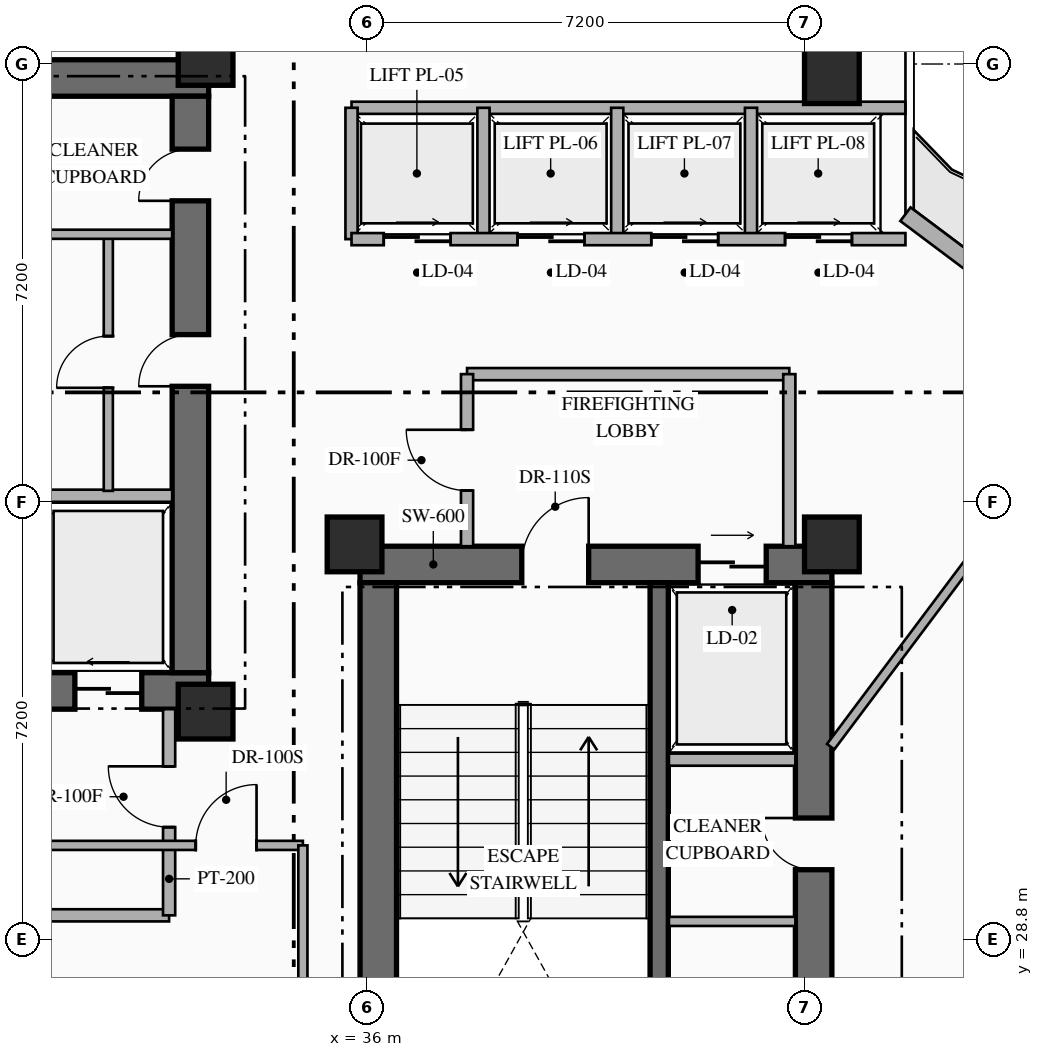
"""IFC4 building model, lengths in metres.
Left out: names, types, materials, properties, quantities, classifications, styles, units other than length and angle.
Written with IfcOpenShell. Run it as: python <this file> out.ifc"""

import sys

from ifc_helpers import new_model, si_unit, direction, frame, frame_2d, origin, origin_2d, place, context, subcontext, project, spatial, rectangle, extrude, element, fill, save


model = new_model("IFC4")
c1 = context("Model", 3, precision=1e-05, world=origin(), true_north=direction((0.0, 1.0)))
c2 = subcontext(c1, "Body", "Model", "MODEL_VIEW")
j1 = project(units=[si_unit("LENGTHUNIT", "METRE"), si_unit("PLANEANGLEUNIT", "RADIAN")], contexts=[c1])
p1 = place(None, origin())
s1 = spatial("IfcSite", under=j1, at=p1, CompositionType="ELEMENT")
p2 = place(p1, origin())
s2 = spatial("IfcBuilding", under=s1, at=p2, CompositionType="ELEMENT")
p3 = place(p2, frame((0.0, 0.0, 152.85)))
s3 = spatial("IfcBuildingStorey", under=s2, at=p3, CompositionType="ELEMENT", Elevation=152.85)
p4 = place(p3, frame((25.62, 32.89, 0.0), z_axis=(0.0, 0.0, 1.0), x_axis=(1.0, 0.0, 0.0)))
e1 = element("IfcWall", 1, at=p4, inside=s3, PredefinedType="SHEAR", context=c2, shape_type="SweptSolid", body=[
    extrude(rectangle(XDim=7.78, YDim=0.6, at=frame_2d((3.89, 0.0))), origin(), (0.0, 0.0, 1.0), 3.6),
])
p5 = place(p4, frame((2.83, 0.0, 0.0)))
e2 = element("IfcOpeningElement", 2, at=p5, cuts=e1, PredefinedType="OPENING", context=c2, shape_type="SweptSolid", body=[
    extrude(rectangle(XDim=1.1, YDim=2.2, at=frame_2d((0.55, 1.1))), frame((0.0, 0.31, 0.0), z_axis=(0.0, -1.0, 0.0), x_axis=(1.0, 0.0, 0.0)), (0.0, 0.0, 1.0), 0.62),
])
p6 = place(p4, frame((5.58, 0.0, 0.0)))
e3 = element("IfcOpeningElement", 3, at=p6, cuts=e1, PredefinedType="OPENING", context=c2, shape_type="SweptSolid", body=[
    extrude(rectangle(XDim=1.1, YDim=2.15, at=frame_2d((0.55, 1.075))), frame((0.0, 0.31, 0.0), z_axis=(0.0, -1.0, 0.0), x_axis=(1.0, 0.0, 0.0)), (0.0, 0.0, 1.0), 0.62),
])
p7 = place(p3, frame((25.62, 42.97, 0.0), z_axis=(0.0, 0.0, 1.0), x_axis=(1.0, 0.0, 0.0)))
e4 = element("IfcWall", 4, at=p7, inside=s3, PredefinedType="SHEAR", context=c2, shape_type="SweptSolid", body=[
    extrude(rectangle(XDim=7.78, YDim=0.6, at=frame_2d((3.89, 0.0))), origin(), (0.0, 0.0, 1.0), 3.6),
])
p8 = place(p3, frame((33.1, 33.19, 0.0), z_axis=(0.0, 0.0, 1.0), x_axis=(0.0, 1.0, 0.0)))
e5 = element("IfcWall", 5, at=p8, inside=s3, PredefinedType="SHEAR", context=c2, shape_type="SweptSolid", body=[
    extrude(rectangle(XDim=9.48, YDim=0.6, at=frame_2d((4.74, 0.0))), origin(), (0.0, 0.0, 1.0), 3.6),
])
p9 = place(p8, frame((4.71, 0.0, 0.0)))
e6 = element("IfcOpeningElement", 6, at=p9, cuts=e5, PredefinedType="OPENING", context=c2, shape_type="SweptSolid", body=[
    extrude(rectangle(XDim=0.85, YDim=2.08, at=frame_2d((0.425, 1.04))), frame((0.0, 0.31, 0.0), z_axis=(0.0, -1.0, 0.0), x_axis=(1.0, 0.0, 0.0)), (0.0, 0.0, 1.0), 0.62),
])
p10 = place(p8, frame((7.76, 0.0, 0.0)))
e7 = element("IfcOpeningElement", 7, at=p10, cuts=e5, PredefinedType="OPENING", context=c2, shape_type="SweptSolid", body=[
    extrude(rectangle(XDim=0.85, YDim=2.08, at=frame_2d((0.425, 1.04))), frame((0.0, 0.31, 0.0), z_axis=(0.0, -1.0, 0.0), x_axis=(1.0, 0.0, 0.0)), (0.0, 0.0, 1.0), 0.62),
])
p11 = place(p3, frame((35.89, 34.97, 0.0), z_axis=(0.0, 0.0, 1.0), x_axis=(1.0, 0.0, 0.0)))
e8 = element("IfcWall", 8, at=p11, inside=s3, PredefinedType="SHEAR", context=c2, shape_type="SweptSolid", body=[
    extrude(rectangle(XDim=7.76, YDim=0.6, at=frame_2d((3.88, 0.0))), origin(), (0.0, 0.0, 1.0), 3.6),
])
p12 = place(p11, frame((2.66, 0.0, 0.0)))
e9 = element("IfcOpeningElement", 9, at=p12, cuts=e8, PredefinedType="OPENING", context=c2, shape_type="SweptSolid", body=[
    extrude(rectangle(XDim=1.1, YDim=2.2, at=frame_2d((0.55, 1.1))), frame((0.0, 0.31, 0.0), z_axis=(0.0, -1.0, 0.0), x_axis=(1.0, 0.0, 0.0)), (0.0, 0.0, 1.0), 0.62),
])
p13 = place(p11, frame((5.56, 0.0, 0.0)))
e10 = element("IfcOpeningElement", 10, at=p13, cuts=e8, PredefinedType="OPENING", context=c2, shape_type="SweptSolid", body=[
    extrude(rectangle(XDim=1.12, YDim=2.15, at=frame_2d((0.56, 1.075))), frame((0.0, 0.31, 0.0), z_axis=(0.0, -1.0, 0.0), x_axis=(1.0, 0.0, 0.0)), (0.0, 0.0, 1.0), 0.62),
])
p14 = place(p3, frame((36.19, 25.19, 0.0), z_axis=(0.0, 0.0, 1.0), x_axis=(0.0, 1.0, 0.0)))
e11 = element("IfcWall", 11, at=p14, inside=s3, PredefinedType="SHEAR", context=c2, shape_type="SweptSolid", body=[
    extrude(rectangle(XDim=9.48, YDim=0.6, at=frame_2d((4.74, 0.0))), origin(), (0.0, 0.0, 1.0), 3.6),
])
p15 = place(p3, frame((43.35, 25.19, 0.0), z_axis=(0.0, 0.0, 1.0), x_axis=(0.0, 1.0, 0.0)))
e12 = element("IfcWall", 12, at=p15, inside=s3, PredefinedType="SHEAR", context=c2, shape_type="SweptSolid", body=[
    extrude(rectangle(XDim=9.48, YDim=0.6, at=frame_2d((4.74, 0.0))), origin(), (0.0, 0.0, 1.0), 3.6),
])
p16 = place(p15, frame((1.51, 0.0, 0.0)))
e13 = element("IfcOpeningElement", 13, at=p16, cuts=e12, PredefinedType="OPENING", context=c2, shape_type="SweptSolid", body=[
    extrude(rectangle(XDim=0.85, YDim=2.08, at=frame_2d((0.425, 1.04))), frame((0.0, 0.31, 0.0), z_axis=(0.0, -1.0, 0.0), x_axis=(1.0, 0.0, 0.0)), (0.0, 0.0, 1.0), 0.62),
])
p17 = place(p15, frame((4.76, 0.0, 0.0)))
e14 = element("IfcOpeningElement", 14, at=p17, cuts=e12, PredefinedType="OPENING", context=c2, shape_type="SweptSolid", body=[
    extrude(rectangle(XDim=0.85, YDim=2.08, at=frame_2d((0.425, 1.04))), frame((0.0, 0.31, 0.0), z_axis=(0.0, -1.0, 0.0), x_axis=(1.0, 0.0, 0.0)), (0.0, 0.0, 1.0), 0.62),
])
p18 = place(p3, frame((40.81, 25.19, 0.0), z_axis=(0.0, 0.0, 1.0), x_axis=(0.0, 1.0, 0.0)))
e15 = element("IfcWall", 15, at=p18, inside=s3, PredefinedType="SHEAR", context=c2, shape_type="SweptSolid", body=[
    extrude(rectangle(XDim=9.48, YDim=0.3, at=frame_2d((4.74, 0.0))), origin(), (0.0, 0.0, 1.0), 3.6),
])
for number, where, z_axis, x_axis in (
    (16, (33.35, 32.55, 0.0), (0.0, 0.0, 1.0), (1.0, 0.0, 0.0)),
    (17, (33.35, 43.3, 0.0), (0.0, 0.0, 1.0), (1.0, 0.0, 0.0)),
    (18, (35.8, 35.3, 0.0), (0.0, 0.0, 1.0), (1.0, 0.0, 0.0)),
    (19, (43.65, 35.3, 0.0), (0.0, 0.0, 1.0), (1.0, 0.0, 0.0)),
    (20, (43.65, 43.0, 0.0), (0.0, 0.0, 1.0), (1.0, 0.0, 0.0)),
):
    element("IfcColumn", number, at=place(p3, frame(where, z_axis=z_axis, x_axis=x_axis)), inside=s3, PredefinedType="COLUMN", context=c2, shape_type="SweptSolid", body=[
        extrude(rectangle(XDim=0.9, YDim=0.9, at=origin_2d()), origin(), (0.0, 0.0, 1.0), 3.6),
    ])
p19 = place(p3, frame((44.86, 40.73, 0.0), z_axis=(0.0, 0.0, 1.0), x_axis=(0.800007624502, -0.599989833863, 0.0)))
e21 = element("IfcWall", 21, at=p19, inside=s3, PredefinedType="STANDARD", context=c2, shape_type="SweptSolid", body=[
    extrude(rectangle(XDim=19.212, YDim=0.28, at=frame_2d((9.606, 0.0))), origin(), (0.0, 0.0, 1.0), 3.35),
])
p20 = place(p19, frame((1.755, 0.0, 0.0)))
e22 = element("IfcOpeningElement", 22, at=p20, cuts=e21, PredefinedType="OPENING", context=c2, shape_type="SweptSolid", body=[
    extrude(rectangle(XDim=1.1, YDim=2.2, at=frame_2d((0.55, 1.1))), frame((0.0, 0.15, 0.0), z_axis=(0.0, -1.0, 0.0), x_axis=(1.0, 0.0, 0.0)), (0.0, 0.0, 1.0), 0.3),
])
p21 = place(p19, frame((13.509, 0.0, 0.85)))
e23 = element("IfcOpeningElement", 23, at=p21, cuts=e21, PredefinedType="OPENING", context=c2, shape_type="SweptSolid", body=[
    extrude(rectangle(XDim=1.8, YDim=2.1, at=frame_2d((0.9, 1.05))), frame((0.0, 0.15, 0.0), z_axis=(0.0, -1.0, 0.0), x_axis=(1.0, 0.0, 0.0)), (0.0, 0.0, 1.0), 0.3),
])
p22 = place(p3, frame((30.7, 36.1, 0.0), z_axis=(0.0, 0.0, 1.0), x_axis=(1.0, 0.0, 0.0)))
e24 = element("IfcWall", 24, at=p22, inside=s3, PredefinedType="STANDARD", context=c2, shape_type="SweptSolid", body=[
    extrude(rectangle(XDim=2.1, YDim=0.2, at=frame_2d((1.05, 0.0))), origin(), (0.0, 0.0, 1.0), 3.35),
])
p23 = place(p3, frame((31.75, 36.18, 0.0), z_axis=(0.0, 0.0, 1.0), x_axis=(0.0, 1.0, 0.0)))
e25 = element("IfcWall", 25, at=p23, inside=s3, PredefinedType="PARTITIONING", context=c2, shape_type="SweptSolid", body=[
    extrude(rectangle(XDim=4.24, YDim=0.15, at=frame_2d((2.12, 0.0))), origin(), (0.0, 0.0, 1.0), 3.35),
])
p24 = place(p23, frame((1.695, 0.0, 0.0)))
e26 = element("IfcOpeningElement", 26, at=p24, cuts=e25, PredefinedType="OPENING", context=c2, shape_type="SweptSolid", body=[
    extrude(rectangle(XDim=0.85, YDim=2.08, at=frame_2d((0.425, 1.04))), frame((0.0, 0.085, 0.0), z_axis=(0.0, -1.0, 0.0), x_axis=(1.0, 0.0, 0.0)), (0.0, 0.0, 1.0), 0.17),
])
p25 = place(p3, frame((30.7, 40.4, 0.0), z_axis=(0.0, 0.0, 1.0), x_axis=(1.0, 0.0, 0.0)))
e27 = element("IfcWall", 27, at=p25, inside=s3, PredefinedType="PARTITIONING", context=c2, shape_type="SweptSolid", body=[
    extrude(rectangle(XDim=2.1, YDim=0.15, at=frame_2d((1.05, 0.0))), origin(), (0.0, 0.0, 1.0), 3.35),
])
p26 = place(p3, frame((40.97, 31.76, 0.0), z_axis=(0.0, 0.0, 1.0), x_axis=(1.0, 0.0, 0.0)))
e28 = element("IfcWall", 28, at=p26, inside=s3, PredefinedType="STANDARD", context=c2, shape_type="SweptSolid", body=[
    extrude(rectangle(XDim=2.08, YDim=0.2, at=frame_2d((1.04, 0.0))), origin(), (0.0, 0.0, 1.0), 3.35),
])
p27 = place(p3, frame((40.97, 29.1, 0.0), z_axis=(0.0, 0.0, 1.0), x_axis=(1.0, 0.0, 0.0)))
e29 = element("IfcWall", 29, at=p27, inside=s3, PredefinedType="PARTITIONING", context=c2, shape_type="SweptSolid", body=[
    extrude(rectangle(XDim=2.08, YDim=0.15, at=frame_2d((1.04, 0.0))), origin(), (0.0, 0.0, 1.0), 3.35),
])
p28 = place(p3, frame((27.6, 29.2, 0.0), z_axis=(0.0, 0.0, 1.0), x_axis=(1.0, 0.0, 0.0)))
e30 = element("IfcWall", 30, at=p28, inside=s3, PredefinedType="STANDARD", context=c2, shape_type="SweptSolid", body=[
    extrude(rectangle(XDim=5.15, YDim=0.2, at=frame_2d((2.575, 0.0))), origin(), (0.0, 0.0, 1.0), 3.35),
])
p29 = place(p3, frame((32.75, 29.2, 0.0), z_axis=(0.0, 0.0, 1.0), x_axis=(0.0, 1.0, 0.0)))
e31 = element("IfcWall", 31, at=p29, inside=s3, PredefinedType="STANDARD", context=c2, shape_type="SweptSolid", body=[
    extrude(rectangle(XDim=3.39, YDim=0.2, at=frame_2d((1.695, 0.0))), origin(), (0.0, 0.0, 1.0), 3.35),
])
p30 = place(p29, frame((1.45, 0.0, 0.0)))
e32 = element("IfcOpeningElement", 32, at=p30, cuts=e31, PredefinedType="OPENING", context=c2, shape_type="SweptSolid", body=[
    extrude(rectangle(XDim=1.0, YDim=2.2, at=frame_2d((0.5, 1.1))), frame((0.0, 0.11, 0.0), z_axis=(0.0, -1.0, 0.0), x_axis=(1.0, 0.0, 0.0)), (0.0, 0.0, 1.0), 0.22),
])
p31 = place(p3, frame((37.65, 38.1, 0.0), z_axis=(0.0, 0.0, 1.0), x_axis=(1.0, 0.0, 0.0)))
e33 = element("IfcWall", 33, at=p31, inside=s3, PredefinedType="STANDARD", context=c2, shape_type="SweptSolid", body=[
    extrude(rectangle(XDim=5.3, YDim=0.2, at=frame_2d((2.65, 0.0))), origin(), (0.0, 0.0, 1.0), 3.35),
])
p32 = place(p3, frame((42.95, 35.27, 0.0), z_axis=(0.0, 0.0, 1.0), x_axis=(0.0, 1.0, 0.0)))
e34 = element("IfcWall", 34, at=p32, inside=s3, PredefinedType="STANDARD", context=c2, shape_type="SweptSolid", body=[
    extrude(rectangle(XDim=2.83, YDim=0.2, at=frame_2d((1.415, 0.0))), origin(), (0.0, 0.0, 1.0), 3.35),
])
p33 = place(p3, frame((37.65, 35.27, 0.0), z_axis=(0.0, 0.0, 1.0), x_axis=(0.0, 1.0, 0.0)))
e35 = element("IfcWall", 35, at=p33, inside=s3, PredefinedType="STANDARD", context=c2, shape_type="SweptSolid", body=[
    extrude(rectangle(XDim=2.83, YDim=0.2, at=frame_2d((1.415, 0.0))), origin(), (0.0, 0.0, 1.0), 3.35),
])
p34 = place(p33, frame((0.915, 0.0, 0.0)))
e36 = element("IfcOpeningElement", 36, at=p34, cuts=e35, PredefinedType="OPENING", context=c2, shape_type="SweptSolid", body=[
    extrude(rectangle(XDim=1.0, YDim=2.2, at=frame_2d((0.5, 1.1))), frame((0.0, 0.11, 0.0), z_axis=(0.0, -1.0, 0.0), x_axis=(1.0, 0.0, 0.0)), (0.0, 0.0, 1.0), 0.22),
])
p35 = place(p3, frame((35.75, 42.48, 0.0), z_axis=(0.0, 0.0, 1.0), x_axis=(1.0, 0.0, 0.0)))
e37 = element("IfcWall", 37, at=p35, inside=s3, PredefinedType="STANDARD", context=c2, shape_type="SweptSolid", body=[
    extrude(rectangle(XDim=9.11, YDim=0.2, at=frame_2d((4.555, 0.0))), origin(), (0.0, 0.0, 1.0), 3.35),
])
for number, where, z_axis, x_axis in (
    (38, (35.75, 40.32, 0.0), (0.0, 0.0, 1.0), (0.0, 1.0, 0.0)),
    (39, (37.92, 40.32, 0.0), (0.0, 0.0, 1.0), (0.0, 1.0, 0.0)),
    (40, (40.12, 40.32, 0.0), (0.0, 0.0, 1.0), (0.0, 1.0, 0.0)),
    (41, (42.32, 40.32, 0.0), (0.0, 0.0, 1.0), (0.0, 1.0, 0.0)),
):
    element("IfcWall", number, at=place(p3, frame(where, z_axis=z_axis, x_axis=x_axis)), inside=s3, PredefinedType="STANDARD", context=c2, shape_type="SweptSolid", body=[
        extrude(rectangle(XDim=2.16, YDim=0.2, at=frame_2d((1.08, 0.0))), origin(), (0.0, 0.0, 1.0), 3.35),
    ])
p36 = place(p3, frame((35.75, 40.32, 0.0), z_axis=(0.0, 0.0, 1.0), x_axis=(1.0, 0.0, 0.0)))
e42 = element("IfcWall", 42, at=p36, inside=s3, PredefinedType="STANDARD", context=c2, shape_type="SweptSolid", body=[
    extrude(rectangle(XDim=9.11, YDim=0.2, at=frame_2d((4.555, 0.0))), origin(), (0.0, 0.0, 1.0), 3.35),
])
p37 = place(p36, frame((0.53, 0.0, 0.0)))
e43 = element("IfcOpeningElement", 43, at=p37, cuts=e42, PredefinedType="OPENING", context=c2, shape_type="SweptSolid", body=[
    extrude(rectangle(XDim=1.1, YDim=2.18, at=frame_2d((0.55, 1.09))), frame((0.0, 0.11, 0.0), z_axis=(0.0, -1.0, 0.0), x_axis=(1.0, 0.0, 0.0)), (0.0, 0.0, 1.0), 0.22),
])
p38 = place(p36, frame((2.73, 0.0, 0.0)))
e44 = element("IfcOpeningElement", 44, at=p38, cuts=e42, PredefinedType="OPENING", context=c2, shape_type="SweptSolid", body=[
    extrude(rectangle(XDim=1.1, YDim=2.18, at=frame_2d((0.55, 1.09))), frame((0.0, 0.11, 0.0), z_axis=(0.0, -1.0, 0.0), x_axis=(1.0, 0.0, 0.0)), (0.0, 0.0, 1.0), 0.22),
])
p39 = place(p36, frame((4.93, 0.0, 0.0)))
e45 = element("IfcOpeningElement", 45, at=p39, cuts=e42, PredefinedType="OPENING", context=c2, shape_type="SweptSolid", body=[
    extrude(rectangle(XDim=1.1, YDim=2.18, at=frame_2d((0.55, 1.09))), frame((0.0, 0.11, 0.0), z_axis=(0.0, -1.0, 0.0), x_axis=(1.0, 0.0, 0.0)), (0.0, 0.0, 1.0), 0.22),
])
p40 = place(p36, frame((7.13, 0.0, 0.0)))
e46 = element("IfcOpeningElement", 46, at=p40, cuts=e42, PredefinedType="OPENING", context=c2, shape_type="SweptSolid", body=[
    extrude(rectangle(XDim=1.1, YDim=2.18, at=frame_2d((0.55, 1.09))), frame((0.0, 0.11, 0.0), z_axis=(0.0, -1.0, 0.0), x_axis=(1.0, 0.0, 0.0)), (0.0, 0.0, 1.0), 0.22),
])
p41 = place(p3, frame((25.55, 30.35, 0.0), z_axis=(0.0, 0.0, 1.0), x_axis=(1.0, 0.0, 0.0)))
e47 = element("IfcWall", 47, at=p41, inside=s3, PredefinedType="PARTITIONING", context=c2, shape_type="SweptSolid", body=[
    extrude(rectangle(XDim=9.4, YDim=0.15, at=frame_2d((4.7, 0.0))), origin(), (0.0, 0.0, 1.0), 3.35),
])
p42 = place(p41, frame((7.638, 0.0, 0.0)))
e48 = element("IfcOpeningElement", 48, at=p42, cuts=e47, PredefinedType="OPENING", context=c2, shape_type="SweptSolid", body=[
    extrude(rectangle(XDim=1.0, YDim=2.15, at=frame_2d((0.5, 1.075))), frame((0.0, 0.085, 0.0), z_axis=(0.0, -1.0, 0.0), x_axis=(1.0, 0.0, 0.0)), (0.0, 0.0, 1.0), 0.17),
])
p43 = place(p3, frame((34.95, 23.2, 0.0), z_axis=(0.0, 0.0, 1.0), x_axis=(0.0, 1.0, 0.0)))
e49 = element("IfcWall", 49, at=p43, inside=s3, PredefinedType="PARTITIONING", context=c2, shape_type="SweptSolid", body=[
    extrude(rectangle(XDim=7.15, YDim=0.15, at=frame_2d((3.575, 0.0))), origin(), (0.0, 0.0, 1.0), 3.35),
])
p44 = place(p3, frame((41.87, 17.96, 0.0), z_axis=(0.0, 0.0, 1.0), x_axis=(0.599994172676, 0.80000437046, 0.0)))
e50 = element("IfcWall", 50, at=p44, inside=s3, PredefinedType="PARTITIONING", context=c2, shape_type="SweptSolid", body=[
    extrude(rectangle(XDim=20.11, YDim=0.15, at=frame_2d((10.055, 0.0))), origin(), (0.0, 0.0, 1.0), 3.35),
])
p45 = place(p44, frame((9.58, 0.0, 0.0)))
e51 = element("IfcOpeningElement", 51, at=p45, cuts=e50, PredefinedType="OPENING", context=c2, shape_type="SweptSolid", body=[
    extrude(rectangle(XDim=0.95, YDim=2.15, at=frame_2d((0.475, 1.075))), frame((0.0, 0.085, 0.0), z_axis=(0.0, -1.0, 0.0), x_axis=(1.0, 0.0, 0.0)), (0.0, 0.0, 1.0), 0.17),
])
p46 = place(p3, frame((43.63, 31.973, 0.0), z_axis=(0.0, 0.0, 1.0), x_axis=(0.599975099311, 0.800018674911, 0.0)))
e52 = element("IfcWall", 52, at=p46, inside=s3, PredefinedType="PARTITIONING", context=c2, shape_type="SweptSolid", body=[
    extrude(rectangle(XDim=7.844, YDim=0.15, at=frame_2d((3.922, 0.0))), origin(), (0.0, 0.0, 1.0), 3.35),
])
p47 = place(p6, origin())
e53 = element("IfcDoor", 53, at=p47, inside=s3, OperationType="SLIDING_TO_LEFT", PredefinedType="USERDEFINED", context=c2, shape_type="SweptSolid", body=[
    extrude(rectangle(XDim=1.1, YDim=2.15, at=frame_2d((0.55, 1.075))), frame((0.0, 0.025, 0.0), z_axis=(0.0, -1.0, 0.0), x_axis=(1.0, 0.0, 0.0)), (0.0, 0.0, 1.0), 0.05),
])
fill(e3, e53)
p48 = place(p12, origin())
e54 = element("IfcDoor", 54, at=p48, inside=s3, OperationType="SINGLE_SWING_RIGHT", PredefinedType="DOOR", context=c2, shape_type="SweptSolid", body=[
    extrude(rectangle(XDim=1.1, YDim=2.2, at=frame_2d((0.55, 1.1))), frame((0.0, 0.025, 0.0), z_axis=(0.0, -1.0, 0.0), x_axis=(1.0, 0.0, 0.0)), (0.0, 0.0, 1.0), 0.05),
])
fill(e9, e54)
p49 = place(p13, origin())
e55 = element("IfcDoor", 55, at=p49, inside=s3, OperationType="SLIDING_TO_RIGHT", PredefinedType="USERDEFINED", context=c2, shape_type="SweptSolid", body=[
    extrude(rectangle(XDim=1.12, YDim=2.15, at=frame_2d((0.56, 1.075))), frame((0.0, 0.025, 0.0), z_axis=(0.0, -1.0, 0.0), x_axis=(1.0, 0.0, 0.0)), (0.0, 0.0, 1.0), 0.05),
])
fill(e10, e55)
p50 = place(p9, origin())
e56 = element("IfcDoor", 56, at=p50, inside=s3, OperationType="SINGLE_SWING_LEFT", PredefinedType="DOOR", context=c2, shape_type="SweptSolid", body=[
    extrude(rectangle(XDim=0.85, YDim=2.08, at=frame_2d((0.425, 1.04))), frame((0.0, 0.025, 0.0), z_axis=(0.0, -1.0, 0.0), x_axis=(1.0, 0.0, 0.0)), (0.0, 0.0, 1.0), 0.05),
])
fill(e6, e56)
p51 = place(p10, origin())
e57 = element("IfcDoor", 57, at=p51, inside=s3, OperationType="SINGLE_SWING_LEFT", PredefinedType="DOOR", context=c2, shape_type="SweptSolid", body=[
    extrude(rectangle(XDim=0.85, YDim=2.08, at=frame_2d((0.425, 1.04))), frame((0.0, 0.025, 0.0), z_axis=(0.0, -1.0, 0.0), x_axis=(1.0, 0.0, 0.0)), (0.0, 0.0, 1.0), 0.05),
])
fill(e7, e57)
p52 = place(p17, origin())
e58 = element("IfcDoor", 58, at=p52, inside=s3, OperationType="SINGLE_SWING_RIGHT", PredefinedType="DOOR", context=c2, shape_type="SweptSolid", body=[
    extrude(rectangle(XDim=0.85, YDim=2.08, at=frame_2d((0.425, 1.04))), frame((0.0, 0.025, 0.0), z_axis=(0.0, -1.0, 0.0), x_axis=(1.0, 0.0, 0.0)), (0.0, 0.0, 1.0), 0.05),
])
fill(e14, e58)
p53 = place(p24, origin())
e59 = element("IfcDoor", 59, at=p53, inside=s3, OperationType="SINGLE_SWING_LEFT", PredefinedType="DOOR", context=c2, shape_type="SweptSolid", body=[
    extrude(rectangle(XDim=0.85, YDim=2.08, at=frame_2d((0.425, 1.04))), frame((0.0, 0.025, 0.0), z_axis=(0.0, -1.0, 0.0), x_axis=(1.0, 0.0, 0.0)), (0.0, 0.0, 1.0), 0.05),
])
fill(e26, e59)
p54 = place(p30, origin())
e60 = element("IfcDoor", 60, at=p54, inside=s3, OperationType="SINGLE_SWING_RIGHT", PredefinedType="DOOR", context=c2, shape_type="SweptSolid", body=[
    extrude(rectangle(XDim=1.0, YDim=2.2, at=frame_2d((0.5, 1.1))), frame((0.0, 0.025, 0.0), z_axis=(0.0, -1.0, 0.0), x_axis=(1.0, 0.0, 0.0)), (0.0, 0.0, 1.0), 0.05),
])
fill(e32, e60)
p55 = place(p34, origin())
e61 = element("IfcDoor", 61, at=p55, inside=s3, OperationType="SINGLE_SWING_RIGHT", PredefinedType="DOOR", context=c2, shape_type="SweptSolid", body=[
    extrude(rectangle(XDim=1.0, YDim=2.2, at=frame_2d((0.5, 1.1))), frame((0.0, 0.025, 0.0), z_axis=(0.0, -1.0, 0.0), x_axis=(1.0, 0.0, 0.0)), (0.0, 0.0, 1.0), 0.05),
])
fill(e36, e61)
p56 = place(p37, origin())
e62 = element("IfcDoor", 62, at=p56, inside=s3, OperationType="SLIDING_TO_RIGHT", PredefinedType="USERDEFINED", context=c2, shape_type="SweptSolid", body=[
    extrude(rectangle(XDim=1.1, YDim=2.18, at=frame_2d((0.55, 1.09))), frame((0.0, 0.025, 0.0), z_axis=(0.0, -1.0, 0.0), x_axis=(1.0, 0.0, 0.0)), (0.0, 0.0, 1.0), 0.05),
])
fill(e43, e62)
p57 = place(p38, origin())
e63 = element("IfcDoor", 63, at=p57, inside=s3, OperationType="SLIDING_TO_RIGHT", PredefinedType="USERDEFINED", context=c2, shape_type="SweptSolid", body=[
    extrude(rectangle(XDim=1.1, YDim=2.18, at=frame_2d((0.55, 1.09))), frame((0.0, 0.025, 0.0), z_axis=(0.0, -1.0, 0.0), x_axis=(1.0, 0.0, 0.0)), (0.0, 0.0, 1.0), 0.05),
])
fill(e44, e63)
p58 = place(p39, origin())
e64 = element("IfcDoor", 64, at=p58, inside=s3, OperationType="SLIDING_TO_RIGHT", PredefinedType="USERDEFINED", context=c2, shape_type="SweptSolid", body=[
    extrude(rectangle(XDim=1.1, YDim=2.18, at=frame_2d((0.55, 1.09))), frame((0.0, 0.025, 0.0), z_axis=(0.0, -1.0, 0.0), x_axis=(1.0, 0.0, 0.0)), (0.0, 0.0, 1.0), 0.05),
])
fill(e45, e64)
p59 = place(p40, origin())
e65 = element("IfcDoor", 65, at=p59, inside=s3, OperationType="SLIDING_TO_RIGHT", PredefinedType="USERDEFINED", context=c2, shape_type="SweptSolid", body=[
    extrude(rectangle(XDim=1.1, YDim=2.18, at=frame_2d((0.55, 1.09))), frame((0.0, 0.025, 0.0), z_axis=(0.0, -1.0, 0.0), x_axis=(1.0, 0.0, 0.0)), (0.0, 0.0, 1.0), 0.05),
])
fill(e46, e65)
p60 = place(p42, origin())
e66 = element("IfcDoor", 66, at=p60, inside=s3, OperationType="SINGLE_SWING_RIGHT", PredefinedType="DOOR", context=c2, shape_type="SweptSolid", body=[
    extrude(rectangle(XDim=1.0, YDim=2.15, at=frame_2d((0.5, 1.075))), frame((0.0, 0.025, 0.0), z_axis=(0.0, -1.0, 0.0), x_axis=(1.0, 0.0, 0.0)), (0.0, 0.0, 1.0), 0.05),
])
fill(e48, e66)
save(model, sys.argv[1])
